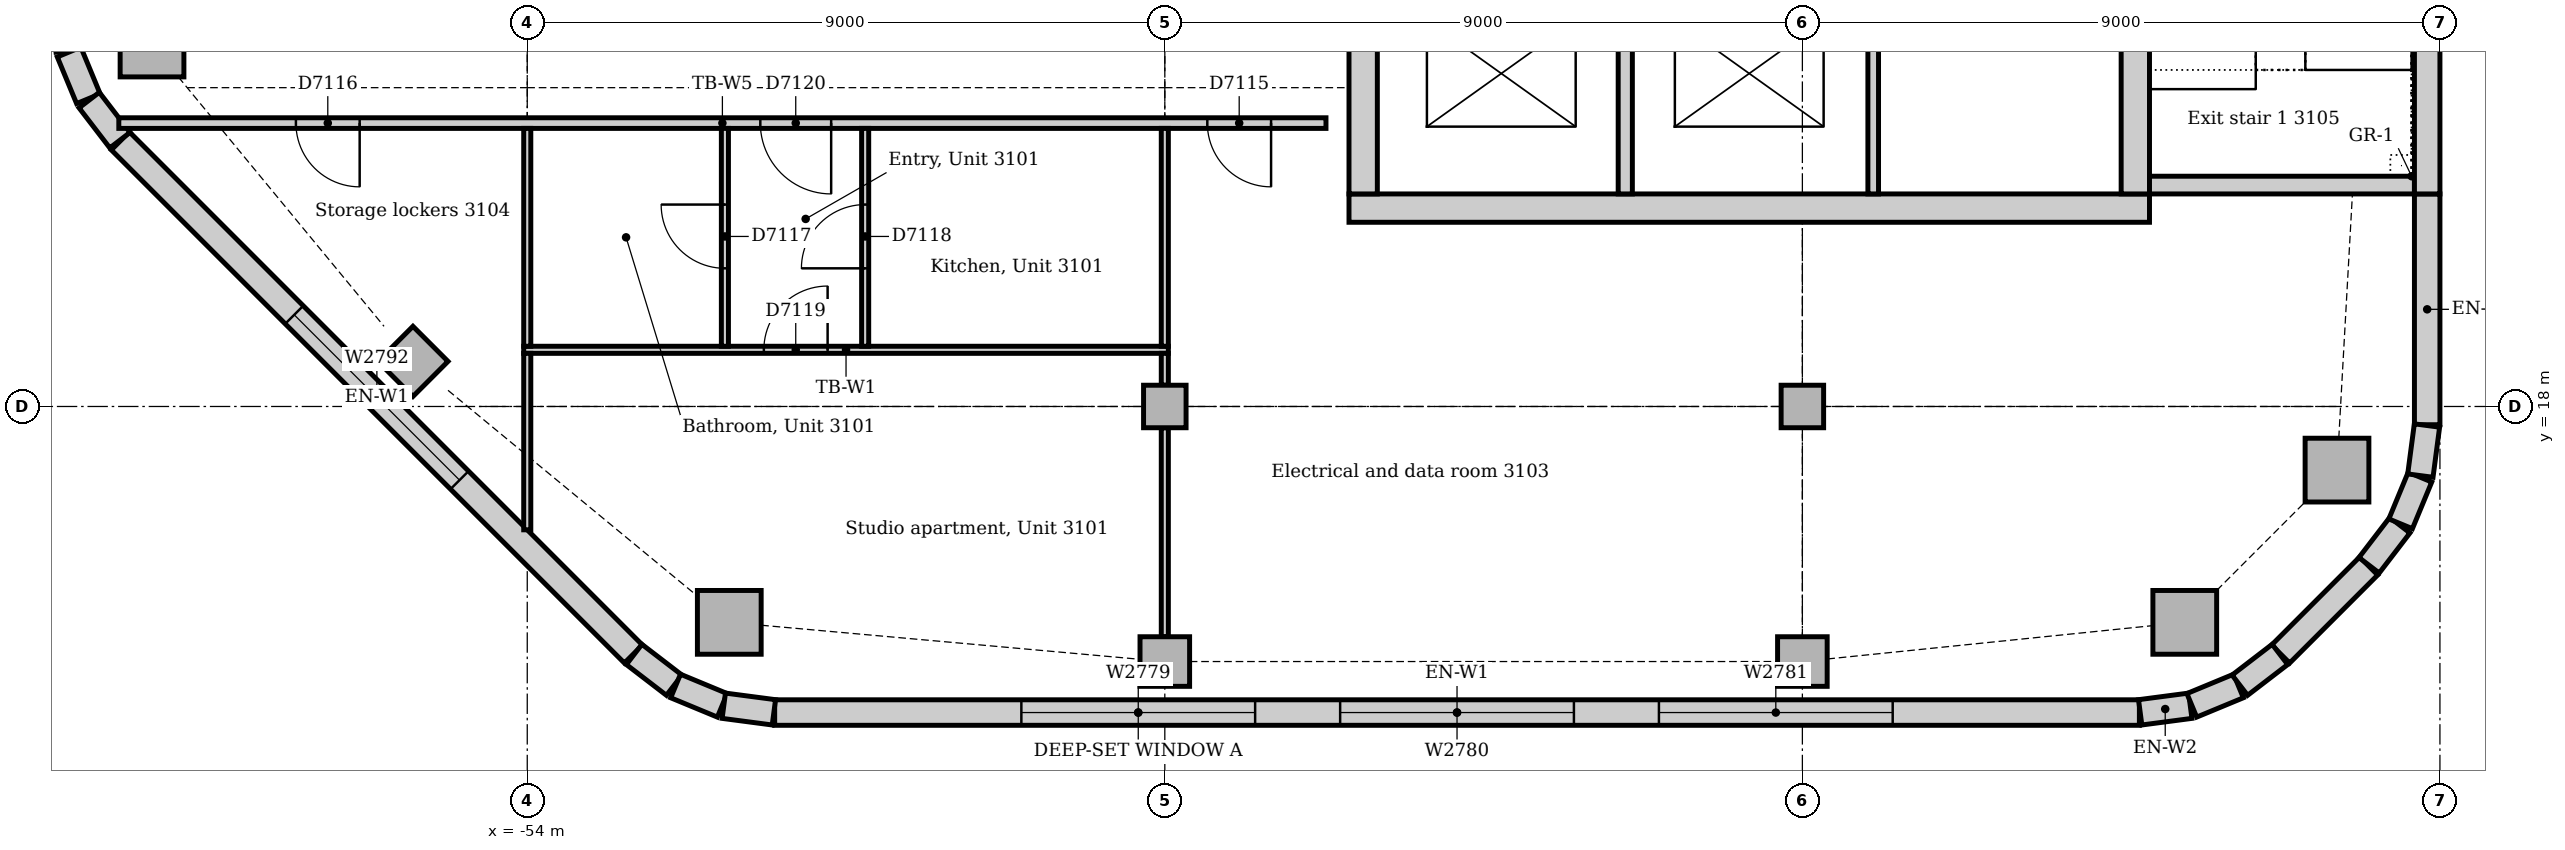
"""IFC4 building model, lengths in metres.
Left out: names, types, materials, properties, quantities, classifications, styles, units other than length and angle.
Written with IfcOpenShell. Run it as: python <this file> out.ifc"""

import sys

from ifc_helpers import new_model, si_unit, direction, frame, frame_2d, origin, origin_2d, place, context, subcontext, project, spatial, rectangle, extrude, element, fill, save


model = new_model("IFC4")
c1 = context("Model", 3, precision=1e-05, world=origin(), true_north=direction((0.0, 1.0)))
c2 = subcontext(c1, "Body", "Model", "MODEL_VIEW")
j1 = project(units=[si_unit("LENGTHUNIT", "METRE"), si_unit("PLANEANGLEUNIT", "RADIAN")], contexts=[c1])
p1 = place(None, origin())
s1 = spatial("IfcSite", under=j1, at=p1, CompositionType="ELEMENT")
p2 = place(p1, origin())
s2 = spatial("IfcBuilding", under=s1, at=p2, CompositionType="ELEMENT")
p3 = place(p2, frame((0.0, 0.0, 132.0)))
s3 = spatial("IfcBuildingStorey", under=s2, at=p3, CompositionType="ELEMENT", Elevation=132.0)
p4 = place(p3, frame((-42.4, 20.8, 0.0), z_axis=(0.0, 0.0, 1.0), x_axis=(1.0, 0.0, 0.0)))
e1 = element("IfcWall", 1, at=p4, inside=s3, PredefinedType="SOLIDWALL", context=c2, shape_type="SweptSolid", body=[
    extrude(rectangle(XDim=11.3, YDim=0.4, at=frame_2d((5.65, 0.0))), origin(), (0.0, 0.0, 1.0), 4.0),
])
p5 = place(p3, frame((-31.3, 21.0, 0.0), z_axis=(0.0, 0.0, 1.0), x_axis=(0.0, 1.0, 0.0)))
e2 = element("IfcWall", 2, at=p5, inside=s3, PredefinedType="SOLIDWALL", context=c2, shape_type="SweptSolid", body=[
    extrude(rectangle(XDim=9.5, YDim=0.4, at=frame_2d((4.75, 0.0))), origin(), (0.0, 0.0, 1.0), 4.0),
])
p6 = place(p5, frame((5.25, 0.0, 0.0)))
e3 = element("IfcOpeningElement", 3, at=p6, cuts=e2, PredefinedType="OPENING", context=c2, shape_type="SweptSolid", body=[
    extrude(rectangle(XDim=1.0, YDim=2.1, at=frame_2d((0.5, 1.05))), frame((0.0, 0.21, 0.0), z_axis=(0.0, -1.0, 0.0), x_axis=(1.0, 0.0, 0.0)), (0.0, 0.0, 1.0), 0.42),
])
p7 = place(p3, frame((-42.2, 30.5, 0.0), z_axis=(0.0, 0.0, 1.0), x_axis=(0.0, -1.0, 0.0)))
e4 = element("IfcWall", 4, at=p7, inside=s3, PredefinedType="SOLIDWALL", context=c2, shape_type="SweptSolid", body=[
    extrude(rectangle(XDim=9.5, YDim=0.4, at=frame_2d((4.75, 0.0))), origin(), (0.0, 0.0, 1.0), 4.0),
])
p8 = place(p7, frame((3.85, 0.0, 0.0)))
e5 = element("IfcOpeningElement", 5, at=p8, cuts=e4, PredefinedType="OPENING", context=c2, shape_type="SweptSolid", body=[
    extrude(rectangle(XDim=1.8, YDim=2.1, at=frame_2d((0.9, 1.05))), frame((0.0, 0.21, 0.0), z_axis=(0.0, -1.0, 0.0), x_axis=(1.0, 0.0, 0.0)), (0.0, 0.0, 1.0), 0.42),
])
p9 = place(p3, frame((-31.1, 21.125, 0.0), z_axis=(0.0, 0.0, 1.0), x_axis=(1.0, 0.0, 0.0)))
e6 = element("IfcWall", 6, at=p9, inside=s3, PredefinedType="SOLIDWALL", context=c2, shape_type="SweptSolid", body=[
    extrude(rectangle(XDim=3.74, YDim=0.25, at=frame_2d((1.87, 0.0))), origin(), (0.0, 0.0, 1.0), 4.0),
])
for number, where, z_axis, x_axis in (
    (7, (-51.148, 14.953, 0.0), (0.0, 0.0, 1.0), (1.0, 0.0, 0.0)),
    (8, (-30.602, 14.953, 0.0), (0.0, 0.0, 1.0), (1.0, 0.0, 0.0)),
    (9, (-28.453, 17.102, 0.0), (0.0, 0.0, 1.0), (1.0, 0.0, 0.0)),
    (10, (-59.297, 23.102, 0.0), (0.0, 0.0, 1.0), (1.0, 0.0, 0.0)),
):
    element("IfcColumn", number, at=place(p3, frame(where, z_axis=z_axis, x_axis=x_axis)), inside=s3, PredefinedType="COLUMN", context=c2, shape_type="SweptSolid", body=[
        extrude(rectangle(XDim=0.9, YDim=0.9, at=origin_2d()), origin(), (0.0, 0.0, 1.0), 3.85),
    ])
for number, where, z_axis, x_axis in (
    (11, (-45.0, 14.4, 0.0), (0.0, 0.0, 1.0), (1.0, 0.0, 0.0)),
    (12, (-36.0, 14.4, 0.0), (0.0, 0.0, 1.0), (1.0, 0.0, 0.0)),
    (13, (-55.614, 18.636, 0.0), (0.0, 0.0, 1.0), (0.707, 0.707, 0.0)),
):
    element("IfcColumn", number, at=place(p3, frame(where, z_axis=z_axis, x_axis=x_axis)), inside=s3, PredefinedType="COLUMN", context=c2, shape_type="SweptSolid", body=[
        extrude(rectangle(XDim=0.7, YDim=0.7, at=origin_2d()), origin(), (0.0, 0.0, 1.0), 3.85),
    ])
for number, where, z_axis, x_axis in (
    (14, (-45.0, 18.0, 0.0), (0.0, 0.0, 1.0), (1.0, 0.0, 0.0)),
    (15, (-36.0, 18.0, 0.0), (0.0, 0.0, 1.0), (1.0, 0.0, 0.0)),
):
    element("IfcColumn", number, at=place(p3, frame(where, z_axis=z_axis, x_axis=x_axis)), inside=s3, PredefinedType="COLUMN", context=c2, shape_type="SweptSolid", body=[
        extrude(rectangle(XDim=0.6, YDim=0.6, at=origin_2d()), origin(), (0.0, 0.0, 1.0), 3.85),
    ])
p10 = place(p3, frame((-50.507, 13.68, 0.0), z_axis=(0.0, 0.0, 1.0), x_axis=(1.0, 0.0, 0.0)))
e16 = element("IfcWall", 16, at=p10, inside=s3, PredefinedType="STANDARD", context=c2, shape_type="SweptSolid", body=[
    extrude(rectangle(XDim=19.265, YDim=0.36, at=frame_2d((9.632, 0.0))), origin(), (0.0, 0.0, 1.0), 3.85),
])
p11 = place(p10, frame((3.482, 0.0, 0.9)))
e17 = element("IfcOpeningElement", 17, at=p11, cuts=e16, PredefinedType="OPENING", context=c2, shape_type="SweptSolid", body=[
    extrude(rectangle(XDim=3.3, YDim=1.6, at=frame_2d((1.65, 0.8))), frame((0.0, 0.19, 0.0), z_axis=(0.0, -1.0, 0.0), x_axis=(1.0, 0.0, 0.0)), (0.0, 0.0, 1.0), 0.38),
])
p12 = place(p10, frame((7.982, 0.0, 0.9)))
e18 = element("IfcOpeningElement", 18, at=p12, cuts=e16, PredefinedType="OPENING", context=c2, shape_type="SweptSolid", body=[
    extrude(rectangle(XDim=3.3, YDim=1.6, at=frame_2d((1.65, 0.8))), frame((0.0, 0.19, 0.0), z_axis=(0.0, -1.0, 0.0), x_axis=(1.0, 0.0, 0.0)), (0.0, 0.0, 1.0), 0.38),
])
p13 = place(p10, frame((12.482, 0.0, 0.9)))
e19 = element("IfcOpeningElement", 19, at=p13, cuts=e16, PredefinedType="OPENING", context=c2, shape_type="SweptSolid", body=[
    extrude(rectangle(XDim=3.3, YDim=1.6, at=frame_2d((1.65, 0.8))), frame((0.0, 0.19, 0.0), z_axis=(0.0, -1.0, 0.0), x_axis=(1.0, 0.0, 0.0)), (0.0, 0.0, 1.0), 0.38),
])
p14 = place(p3, frame((-29.249, 14.506, 0.0), z_axis=(0.0, 0.0, 1.0), x_axis=(0.707106781187, 0.707106781187, 0.0)))
e20 = element("IfcWall", 20, at=p14, inside=s3, PredefinedType="STANDARD", context=c2, shape_type="SweptSolid", body=[
    extrude(rectangle(XDim=1.757, YDim=0.36, at=frame_2d((0.879, 0.0))), origin(), (0.0, 0.0, 1.0), 3.85),
])
p15 = place(p3, frame((-27.18, 17.743, 0.0), z_axis=(0.0, 0.0, 1.0), x_axis=(0.0, 1.0, 0.0)))
e21 = element("IfcWall", 21, at=p15, inside=s3, PredefinedType="STANDARD", context=c2, shape_type="SweptSolid", body=[
    extrude(rectangle(XDim=3.257, YDim=0.36, at=frame_2d((1.629, 0.0))), origin(), (0.0, 0.0, 1.0), 3.85),
])
p16 = place(p3, frame((-27.18, 21.0, 0.0), z_axis=(0.0, 0.0, 1.0), x_axis=(0.0, 1.0, 0.0)))
e22 = element("IfcWall", 22, at=p16, inside=s3, PredefinedType="STANDARD", context=c2, shape_type="SweptSolid", body=[
    extrude(rectangle(XDim=6.75, YDim=0.36, at=frame_2d((3.375, 0.0))), origin(), (0.0, 0.0, 1.0), 3.85),
])
p17 = place(p3, frame((-59.744, 21.749, 0.0), z_axis=(0.0, 0.0, 1.0), x_axis=(0.707106781187, -0.707106781187, 0.0)))
e23 = element("IfcWall", 23, at=p17, inside=s3, PredefinedType="STANDARD", context=c2, shape_type="SweptSolid", body=[
    extrude(rectangle(XDim=10.243, YDim=0.36, at=frame_2d((5.121, 0.0))), origin(), (0.0, 0.0, 1.0), 3.85),
])
p18 = place(p17, frame((3.471, 0.0, 0.9)))
e24 = element("IfcOpeningElement", 24, at=p18, cuts=e23, PredefinedType="OPENING", context=c2, shape_type="SweptSolid", body=[
    extrude(rectangle(XDim=3.3, YDim=1.6, at=frame_2d((1.65, 0.8))), frame((0.0, 0.19, 0.0), z_axis=(0.0, -1.0, 0.0), x_axis=(1.0, 0.0, 0.0)), (0.0, 0.0, 1.0), 0.38),
])
for number, where, z_axis, x_axis in (
    (25, (-31.231, 13.683, 0.0), (0.0, 0.0, 1.0), (0.991, 0.131, 0.0)),
    (26, (-30.503, 13.782, 0.0), (0.0, 0.0, 1.0), (0.924, 0.383, 0.0)),
):
    element("IfcWall", number, at=place(p3, frame(where, z_axis=z_axis, x_axis=x_axis)), inside=s3, PredefinedType="STANDARD", context=c2, shape_type="SweptSolid", body=[
        extrude(rectangle(XDim=0.713, YDim=0.36, at=frame_2d((0.356, 0.0))), origin(), (0.0, 0.0, 1.0), 3.85),
    ])
for number, where, z_axis, x_axis in (
    (27, (-29.825, 14.066, 0.0), (0.0, 0.0, 1.0), (0.793, 0.609, 0.0)),
    (28, (-28.0, 15.759, 0.0), (0.0, 0.0, 1.0), (0.609, 0.793, 0.0)),
):
    element("IfcWall", number, at=place(p3, frame(where, z_axis=z_axis, x_axis=x_axis)), inside=s3, PredefinedType="STANDARD", context=c2, shape_type="SweptSolid", body=[
        extrude(rectangle(XDim=0.713, YDim=0.36, at=frame_2d((0.357, 0.0))), origin(), (0.0, 0.0, 1.0), 3.85),
    ])
for number, where, z_axis, x_axis in (
    (29, (-27.555, 16.344, 0.0), (0.0, 0.0, 1.0), (0.383, 0.924, 0.0)),
    (30, (-27.276, 17.024, 0.0), (0.0, 0.0, 1.0), (0.131, 0.991, 0.0)),
    (31, (-60.468, 23.003, 0.0), (0.0, 0.0, 1.0), (0.383, -0.924, 0.0)),
):
    element("IfcWall", number, at=place(p3, frame(where, z_axis=z_axis, x_axis=x_axis)), inside=s3, PredefinedType="STANDARD", context=c2, shape_type="SweptSolid", body=[
        extrude(rectangle(XDim=0.713, YDim=0.36, at=frame_2d((0.356, 0.0))), origin(), (0.0, 0.0, 1.0), 3.85),
    ])
for number, where, z_axis, x_axis in (
    (32, (-60.184, 22.325, 0.0), (0.0, 0.0, 1.0), (0.609, -0.793, 0.0)),
    (33, (-52.491, 14.5, 0.0), (0.0, 0.0, 1.0), (0.793, -0.609, 0.0)),
):
    element("IfcWall", number, at=place(p3, frame(where, z_axis=z_axis, x_axis=x_axis)), inside=s3, PredefinedType="STANDARD", context=c2, shape_type="SweptSolid", body=[
        extrude(rectangle(XDim=0.713, YDim=0.36, at=frame_2d((0.357, 0.0))), origin(), (0.0, 0.0, 1.0), 3.85),
    ])
for number, where, z_axis, x_axis in (
    (34, (-51.906, 14.055, 0.0), (0.0, 0.0, 1.0), (0.924, -0.383, 0.0)),
    (35, (-51.226, 13.776, 0.0), (0.0, 0.0, 1.0), (0.991, -0.131, 0.0)),
):
    element("IfcWall", number, at=place(p3, frame(where, z_axis=z_axis, x_axis=x_axis)), inside=s3, PredefinedType="STANDARD", context=c2, shape_type="SweptSolid", body=[
        extrude(rectangle(XDim=0.713, YDim=0.36, at=frame_2d((0.356, 0.0))), origin(), (0.0, 0.0, 1.0), 3.85),
    ])
p19 = place(p3, frame((-38.5, 21.0, 0.0), z_axis=(0.0, 0.0, 1.0), x_axis=(0.0, 1.0, 0.0)))
e36 = element("IfcWall", 36, at=p19, inside=s3, PredefinedType="SOLIDWALL", context=c2, shape_type="SweptSolid", body=[
    extrude(rectangle(XDim=3.1, YDim=0.2, at=frame_2d((1.55, 0.0))), origin(), (0.0, 0.0, 1.0), 4.0),
])
p20 = place(p3, frame((-35.0, 21.0, 0.0), z_axis=(0.0, 0.0, 1.0), x_axis=(0.0, 1.0, 0.0)))
e37 = element("IfcWall", 37, at=p20, inside=s3, PredefinedType="SOLIDWALL", context=c2, shape_type="SweptSolid", body=[
    extrude(rectangle(XDim=2.9, YDim=0.15, at=frame_2d((1.45, 0.0))), origin(), (0.0, 0.0, 1.0), 4.0),
])
p21 = place(p3, frame((-59.766, 22.0, 0.0), z_axis=(0.0, 0.0, 1.0), x_axis=(1.0, 0.0, 0.0)))
e38 = element("IfcWall", 38, at=p21, inside=s3, PredefinedType="PARTITIONING", context=c2, shape_type="SweptSolid", body=[
    extrude(rectangle(XDim=17.041, YDim=0.15, at=frame_2d((8.52, 0.0))), origin(), (0.0, 0.0, 1.0), 3.85),
])
p22 = place(p21, frame((15.366, 0.0, 0.0)))
e39 = element("IfcOpeningElement", 39, at=p22, cuts=e38, PredefinedType="OPENING", context=c2, shape_type="SweptSolid", body=[
    extrude(rectangle(XDim=0.9, YDim=2.1, at=frame_2d((0.45, 1.05))), frame((0.0, 0.085, 0.0), z_axis=(0.0, -1.0, 0.0), x_axis=(1.0, 0.0, 0.0)), (0.0, 0.0, 1.0), 0.17),
])
p23 = place(p21, frame((2.5, 0.0, 0.0)))
e40 = element("IfcOpeningElement", 40, at=p23, cuts=e38, PredefinedType="OPENING", context=c2, shape_type="SweptSolid", body=[
    extrude(rectangle(XDim=0.9, YDim=2.1, at=frame_2d((0.45, 1.05))), frame((0.0, 0.085, 0.0), z_axis=(0.0, -1.0, 0.0), x_axis=(1.0, 0.0, 0.0)), (0.0, 0.0, 1.0), 0.17),
])
p24 = place(p21, frame((9.056, 0.0, 0.0)))
e41 = element("IfcOpeningElement", 41, at=p24, cuts=e38, PredefinedType="OPENING", context=c2, shape_type="SweptSolid", body=[
    extrude(rectangle(XDim=1.0, YDim=2.1, at=frame_2d((0.5, 1.05))), frame((0.0, 0.085, 0.0), z_axis=(0.0, -1.0, 0.0), x_axis=(1.0, 0.0, 0.0)), (0.0, 0.0, 1.0), 0.17),
])
p25 = place(p3, frame((-54.05, 18.8, 0.0), z_axis=(0.0, 0.0, 1.0), x_axis=(1.0, 0.0, 0.0)))
e42 = element("IfcWall", 42, at=p25, inside=s3, PredefinedType="PARTITIONING", context=c2, shape_type="SweptSolid", body=[
    extrude(rectangle(XDim=9.1, YDim=0.1, at=frame_2d((4.55, 0.0))), origin(), (0.0, 0.0, 1.0), 3.85),
])
p26 = place(p25, frame((3.39, 0.0, 0.0)))
e43 = element("IfcOpeningElement", 43, at=p26, cuts=e42, PredefinedType="OPENING", context=c2, shape_type="SweptSolid", body=[
    extrude(rectangle(XDim=0.9, YDim=2.1, at=frame_2d((0.45, 1.05))), frame((0.0, 0.06, 0.0), z_axis=(0.0, -1.0, 0.0), x_axis=(1.0, 0.0, 0.0)), (0.0, 0.0, 1.0), 0.12),
])
p27 = place(p3, frame((-45.0, 18.85, 0.0), z_axis=(0.0, 0.0, 1.0), x_axis=(0.0, 1.0, 0.0)))
e44 = element("IfcWall", 44, at=p27, inside=s3, PredefinedType="PARTITIONING", context=c2, shape_type="SweptSolid", body=[
    extrude(rectangle(XDim=3.075, YDim=0.1, at=frame_2d((1.538, 0.0))), origin(), (0.0, 0.0, 1.0), 3.362),
])
p28 = place(p3, frame((-45.0, 18.3, 0.0), z_axis=(0.0, 0.0, 1.0), x_axis=(0.0, 1.0, 0.0)))
e45 = element("IfcWall", 45, at=p28, inside=s3, PredefinedType="PARTITIONING", context=c2, shape_type="SweptSolid", body=[
    extrude(rectangle(XDim=0.45, YDim=0.1, at=frame_2d((0.225, 0.0))), origin(), (0.0, 0.0, 1.0), 3.85),
])
p29 = place(p3, frame((-45.0, 14.75, 0.0), z_axis=(0.0, 0.0, 1.0), x_axis=(0.0, 1.0, 0.0)))
e46 = element("IfcWall", 46, at=p29, inside=s3, PredefinedType="PARTITIONING", context=c2, shape_type="SweptSolid", body=[
    extrude(rectangle(XDim=2.95, YDim=0.1, at=frame_2d((1.475, 0.0))), origin(), (0.0, 0.0, 1.0), 3.652),
])
p30 = place(p3, frame((-54.0, 18.85, 0.0), z_axis=(0.0, 0.0, 1.0), x_axis=(0.0, 1.0, 0.0)))
e47 = element("IfcWall", 47, at=p30, inside=s3, PredefinedType="PARTITIONING", context=c2, shape_type="SweptSolid", body=[
    extrude(rectangle(XDim=3.075, YDim=0.1, at=frame_2d((1.538, 0.0))), origin(), (0.0, 0.0, 1.0), 3.362),
])
p31 = place(p3, frame((-54.0, 16.259, 0.0), z_axis=(0.0, 0.0, 1.0), x_axis=(0.0, 1.0, 0.0)))
e48 = element("IfcWall", 48, at=p31, inside=s3, PredefinedType="PARTITIONING", context=c2, shape_type="SweptSolid", body=[
    extrude(rectangle(XDim=2.491, YDim=0.1, at=frame_2d((1.245, 0.0))), origin(), (0.0, 0.0, 1.0), 3.362),
])
p32 = place(p3, frame((-51.21, 18.85, 0.0), z_axis=(0.0, 0.0, 1.0), x_axis=(0.0, 1.0, 0.0)))
e49 = element("IfcWall", 49, at=p32, inside=s3, PredefinedType="PARTITIONING", context=c2, shape_type="SweptSolid", body=[
    extrude(rectangle(XDim=3.075, YDim=0.1, at=frame_2d((1.538, 0.0))), origin(), (0.0, 0.0, 1.0), 3.85),
])
p33 = place(p32, frame((1.1, 0.0, 0.0)))
e50 = element("IfcOpeningElement", 50, at=p33, cuts=e49, PredefinedType="OPENING", context=c2, shape_type="SweptSolid", body=[
    extrude(rectangle(XDim=0.9, YDim=2.1, at=frame_2d((0.45, 1.05))), frame((0.0, 0.06, 0.0), z_axis=(0.0, -1.0, 0.0), x_axis=(1.0, 0.0, 0.0)), (0.0, 0.0, 1.0), 0.12),
])
p34 = place(p3, frame((-49.23, 18.85, 0.0), z_axis=(0.0, 0.0, 1.0), x_axis=(0.0, 1.0, 0.0)))
e51 = element("IfcWall", 51, at=p34, inside=s3, PredefinedType="PARTITIONING", context=c2, shape_type="SweptSolid", body=[
    extrude(rectangle(XDim=3.075, YDim=0.1, at=frame_2d((1.538, 0.0))), origin(), (0.0, 0.0, 1.0), 3.85),
])
p35 = place(p34, frame((1.1, 0.0, 0.0)))
e52 = element("IfcOpeningElement", 52, at=p35, cuts=e51, PredefinedType="OPENING", context=c2, shape_type="SweptSolid", body=[
    extrude(rectangle(XDim=0.9, YDim=2.1, at=frame_2d((0.45, 1.05))), frame((0.0, 0.06, 0.0), z_axis=(0.0, -1.0, 0.0), x_axis=(1.0, 0.0, 0.0)), (0.0, 0.0, 1.0), 0.12),
])
p36 = place(p11, origin())
e53 = element("IfcWindow", 53, at=p36, inside=s3, PartitioningType="SINGLE_PANEL", PredefinedType="WINDOW", context=c2, shape_type="SweptSolid", body=[
    extrude(rectangle(XDim=3.3, YDim=1.6, at=frame_2d((1.65, 0.8))), frame((0.0, 0.13, 0.0), z_axis=(0.0, -1.0, 0.0), x_axis=(1.0, 0.0, 0.0)), (0.0, 0.0, 1.0), 0.06),
])
fill(e17, e53)
p37 = place(p12, origin())
e54 = element("IfcWindow", 54, at=p37, inside=s3, PartitioningType="SINGLE_PANEL", PredefinedType="WINDOW", context=c2, shape_type="SweptSolid", body=[
    extrude(rectangle(XDim=3.3, YDim=1.6, at=frame_2d((1.65, 0.8))), frame((0.0, 0.13, 0.0), z_axis=(0.0, -1.0, 0.0), x_axis=(1.0, 0.0, 0.0)), (0.0, 0.0, 1.0), 0.06),
])
fill(e18, e54)
p38 = place(p13, origin())
e55 = element("IfcWindow", 55, at=p38, inside=s3, PartitioningType="SINGLE_PANEL", PredefinedType="WINDOW", context=c2, shape_type="SweptSolid", body=[
    extrude(rectangle(XDim=3.3, YDim=1.6, at=frame_2d((1.65, 0.8))), frame((0.0, 0.13, 0.0), z_axis=(0.0, -1.0, 0.0), x_axis=(1.0, 0.0, 0.0)), (0.0, 0.0, 1.0), 0.06),
])
fill(e19, e55)
p39 = place(p18, origin())
e56 = element("IfcWindow", 56, at=p39, inside=s3, PartitioningType="SINGLE_PANEL", PredefinedType="WINDOW", context=c2, shape_type="SweptSolid", body=[
    extrude(rectangle(XDim=3.3, YDim=1.6, at=frame_2d((1.65, 0.8))), frame((0.0, 0.13, 0.0), z_axis=(0.0, -1.0, 0.0), x_axis=(1.0, 0.0, 0.0)), (0.0, 0.0, 1.0), 0.06),
])
fill(e24, e56)
p40 = place(p22, frame((0.9, 0.0, 0.0), z_axis=(0.0, 0.0, 1.0), x_axis=(-1.0, 0.0, 0.0)))
e57 = element("IfcDoor", 57, at=p40, inside=s3, OperationType="SINGLE_SWING_LEFT", PredefinedType="DOOR", context=c2, shape_type="SweptSolid", body=[
    extrude(rectangle(XDim=0.9, YDim=2.1, at=frame_2d((0.45, 1.05))), frame((0.0, 0.025, 0.0), z_axis=(0.0, -1.0, 0.0), x_axis=(1.0, 0.0, 0.0)), (0.0, 0.0, 1.0), 0.05),
])
fill(e39, e57)
p41 = place(p23, frame((0.9, 0.0, 0.0), z_axis=(0.0, 0.0, 1.0), x_axis=(-1.0, 0.0, 0.0)))
e58 = element("IfcDoor", 58, at=p41, inside=s3, OperationType="SINGLE_SWING_LEFT", PredefinedType="DOOR", context=c2, shape_type="SweptSolid", body=[
    extrude(rectangle(XDim=0.9, YDim=2.1, at=frame_2d((0.45, 1.05))), frame((0.0, 0.025, 0.0), z_axis=(0.0, -1.0, 0.0), x_axis=(1.0, 0.0, 0.0)), (0.0, 0.0, 1.0), 0.05),
])
fill(e40, e58)
p42 = place(p33, origin())
e59 = element("IfcDoor", 59, at=p42, inside=s3, OperationType="SINGLE_SWING_RIGHT", PredefinedType="DOOR", context=c2, shape_type="SweptSolid", body=[
    extrude(rectangle(XDim=0.9, YDim=2.1, at=frame_2d((0.45, 1.05))), frame((0.0, 0.025, 0.0), z_axis=(0.0, -1.0, 0.0), x_axis=(1.0, 0.0, 0.0)), (0.0, 0.0, 1.0), 0.05),
])
fill(e50, e59)
p43 = place(p35, origin())
e60 = element("IfcDoor", 60, at=p43, inside=s3, OperationType="SINGLE_SWING_LEFT", PredefinedType="DOOR", context=c2, shape_type="SweptSolid", body=[
    extrude(rectangle(XDim=0.9, YDim=2.1, at=frame_2d((0.45, 1.05))), frame((0.0, 0.025, 0.0), z_axis=(0.0, -1.0, 0.0), x_axis=(1.0, 0.0, 0.0)), (0.0, 0.0, 1.0), 0.05),
])
fill(e52, e60)
p44 = place(p26, origin())
e61 = element("IfcDoor", 61, at=p44, inside=s3, OperationType="SINGLE_SWING_RIGHT", PredefinedType="DOOR", context=c2, shape_type="SweptSolid", body=[
    extrude(rectangle(XDim=0.9, YDim=2.1, at=frame_2d((0.45, 1.05))), frame((0.0, 0.025, 0.0), z_axis=(0.0, -1.0, 0.0), x_axis=(1.0, 0.0, 0.0)), (0.0, 0.0, 1.0), 0.05),
])
fill(e43, e61)
p45 = place(p24, frame((1.0, 0.0, 0.0), z_axis=(0.0, 0.0, 1.0), x_axis=(-1.0, 0.0, 0.0)))
e62 = element("IfcDoor", 62, at=p45, inside=s3, OperationType="SINGLE_SWING_LEFT", PredefinedType="DOOR", context=c2, shape_type="SweptSolid", body=[
    extrude(rectangle(XDim=1.0, YDim=2.1, at=frame_2d((0.5, 1.05))), frame((0.0, 0.025, 0.0), z_axis=(0.0, -1.0, 0.0), x_axis=(1.0, 0.0, 0.0)), (0.0, 0.0, 1.0), 0.05),
])
fill(e41, e62)
save(model, sys.argv[1])
